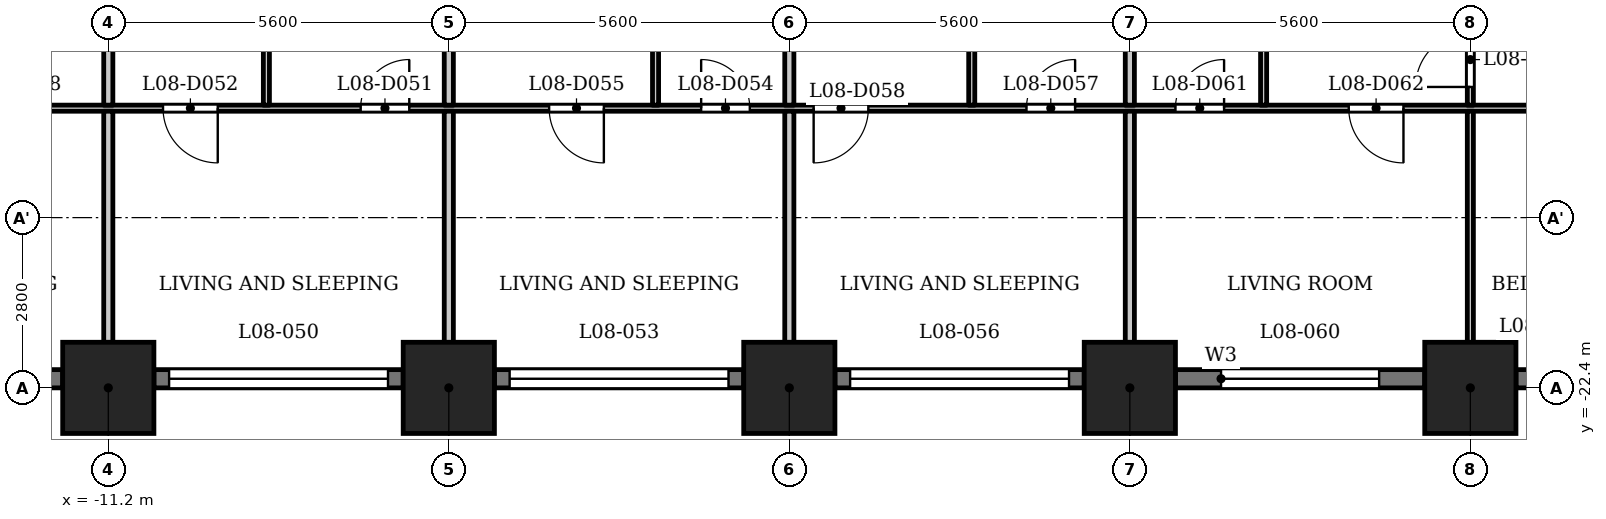
"""IFC4 building model, lengths in metres.
Left out: names, types, materials, properties, quantities, classifications, styles, units other than length and angle.
Written with IfcOpenShell. Run it as: python <this file> out.ifc"""

import sys

from ifc_helpers import new_model, si_unit, direction, frame, frame_2d, origin, origin_2d, place, context, subcontext, project, spatial, rectangle, extrude, element, fill, save


model = new_model("IFC4")
c1 = context("Model", 3, precision=1e-05, world=origin(), true_north=direction((0.0, 1.0)))
c2 = subcontext(c1, "Body", "Model", "MODEL_VIEW")
j1 = project(units=[si_unit("LENGTHUNIT", "METRE"), si_unit("PLANEANGLEUNIT", "RADIAN")], contexts=[c1])
p1 = place(None, origin())
s1 = spatial("IfcSite", under=j1, at=p1, CompositionType="ELEMENT")
p2 = place(p1, origin())
s2 = spatial("IfcBuilding", under=s1, at=p2, CompositionType="ELEMENT")
p3 = place(p2, frame((0.0, 0.0, 37.5)))
s3 = spatial("IfcBuildingStorey", under=s2, at=p3, CompositionType="ELEMENT", Elevation=37.5)
for number, where, z_axis, x_axis in (
    (1, (-11.2, -22.4, 0.0), (0.0, 0.0, 1.0), (1.0, 0.0, 0.0)),
    (2, (-5.6, -22.4, 0.0), (0.0, 0.0, 1.0), (1.0, 0.0, 0.0)),
    (3, (0.0, -22.4, 0.0), (0.0, 0.0, 1.0), (1.0, 0.0, 0.0)),
    (4, (5.6, -22.4, 0.0), (0.0, 0.0, 1.0), (1.0, 0.0, 0.0)),
    (5, (11.2, -22.4, 0.0), (0.0, 0.0, 1.0), (1.0, 0.0, 0.0)),
):
    element("IfcColumn", number, at=place(p3, frame(where, z_axis=z_axis, x_axis=x_axis)), inside=s3, PredefinedType="COLUMN", context=c2, shape_type="SweptSolid", body=[
        extrude(rectangle(XDim=1.5, YDim=1.5, at=origin_2d()), origin(), (0.0, 0.0, 1.0), 3.5),
    ])
p4 = place(p3, frame((-16.05, -22.25, 0.0), z_axis=(0.0, 0.0, 1.0), x_axis=(1.0, 0.0, 0.0)))
e6 = element("IfcWall", 6, at=p4, inside=s3, PredefinedType="SOLIDWALL", context=c2, shape_type="SweptSolid", body=[
    extrude(rectangle(XDim=4.1, YDim=0.3, at=frame_2d((2.05, 0.0))), origin(), (0.0, 0.0, 1.0), 2.35),
])
p5 = place(p4, frame((0.25, 0.0, 1.2)))
e7 = element("IfcOpeningElement", 7, at=p5, cuts=e6, PredefinedType="OPENING", context=c2, shape_type="SweptSolid", body=[
    extrude(rectangle(XDim=3.6, YDim=0.95, at=frame_2d((1.8, 0.475))), frame((0.0, 0.16, 0.0), z_axis=(0.0, -1.0, 0.0), x_axis=(1.0, 0.0, 0.0)), (0.0, 0.0, 1.0), 0.32),
])
p6 = place(p3, frame((-10.45, -22.25, 0.0), z_axis=(0.0, 0.0, 1.0), x_axis=(1.0, 0.0, 0.0)))
e8 = element("IfcWall", 8, at=p6, inside=s3, PredefinedType="SOLIDWALL", context=c2, shape_type="SweptSolid", body=[
    extrude(rectangle(XDim=4.1, YDim=0.3, at=frame_2d((2.05, 0.0))), origin(), (0.0, 0.0, 1.0), 2.35),
])
p7 = place(p6, frame((0.25, 0.0, 1.2)))
e9 = element("IfcOpeningElement", 9, at=p7, cuts=e8, PredefinedType="OPENING", context=c2, shape_type="SweptSolid", body=[
    extrude(rectangle(XDim=3.6, YDim=0.95, at=frame_2d((1.8, 0.475))), frame((0.0, 0.16, 0.0), z_axis=(0.0, -1.0, 0.0), x_axis=(1.0, 0.0, 0.0)), (0.0, 0.0, 1.0), 0.32),
])
p8 = place(p3, frame((-4.85, -22.25, 0.0), z_axis=(0.0, 0.0, 1.0), x_axis=(1.0, 0.0, 0.0)))
e10 = element("IfcWall", 10, at=p8, inside=s3, PredefinedType="SOLIDWALL", context=c2, shape_type="SweptSolid", body=[
    extrude(rectangle(XDim=4.1, YDim=0.3, at=frame_2d((2.05, 0.0))), origin(), (0.0, 0.0, 1.0), 2.35),
])
p9 = place(p8, frame((0.25, 0.0, 1.2)))
e11 = element("IfcOpeningElement", 11, at=p9, cuts=e10, PredefinedType="OPENING", context=c2, shape_type="SweptSolid", body=[
    extrude(rectangle(XDim=3.6, YDim=0.95, at=frame_2d((1.8, 0.475))), frame((0.0, 0.16, 0.0), z_axis=(0.0, -1.0, 0.0), x_axis=(1.0, 0.0, 0.0)), (0.0, 0.0, 1.0), 0.32),
])
p10 = place(p3, frame((0.75, -22.25, 0.0), z_axis=(0.0, 0.0, 1.0), x_axis=(1.0, 0.0, 0.0)))
e12 = element("IfcWall", 12, at=p10, inside=s3, PredefinedType="SOLIDWALL", context=c2, shape_type="SweptSolid", body=[
    extrude(rectangle(XDim=4.1, YDim=0.3, at=frame_2d((2.05, 0.0))), origin(), (0.0, 0.0, 1.0), 2.35),
])
p11 = place(p10, frame((0.25, 0.0, 1.2)))
e13 = element("IfcOpeningElement", 13, at=p11, cuts=e12, PredefinedType="OPENING", context=c2, shape_type="SweptSolid", body=[
    extrude(rectangle(XDim=3.6, YDim=0.95, at=frame_2d((1.8, 0.475))), frame((0.0, 0.16, 0.0), z_axis=(0.0, -1.0, 0.0), x_axis=(1.0, 0.0, 0.0)), (0.0, 0.0, 1.0), 0.32),
])
p12 = place(p3, frame((6.35, -22.25, 0.0), z_axis=(0.0, 0.0, 1.0), x_axis=(1.0, 0.0, 0.0)))
e14 = element("IfcWall", 14, at=p12, inside=s3, PredefinedType="SOLIDWALL", context=c2, shape_type="SweptSolid", body=[
    extrude(rectangle(XDim=4.1, YDim=0.3, at=frame_2d((2.05, 0.0))), origin(), (0.0, 0.0, 1.0), 2.35),
])
p13 = place(p12, frame((0.75, 0.0, 0.9)))
e15 = element("IfcOpeningElement", 15, at=p13, cuts=e14, PredefinedType="OPENING", context=c2, shape_type="SweptSolid", body=[
    extrude(rectangle(XDim=2.6, YDim=1.25, at=frame_2d((1.3, 0.625))), frame((0.0, 0.16, 0.0), z_axis=(0.0, -1.0, 0.0), x_axis=(1.0, 0.0, 0.0)), (0.0, 0.0, 1.0), 0.32),
])
p14 = place(p3, frame((11.95, -22.25, 0.0), z_axis=(0.0, 0.0, 1.0), x_axis=(1.0, 0.0, 0.0)))
e16 = element("IfcWall", 16, at=p14, inside=s3, PredefinedType="SOLIDWALL", context=c2, shape_type="SweptSolid", body=[
    extrude(rectangle(XDim=4.1, YDim=0.3, at=frame_2d((2.05, 0.0))), origin(), (0.0, 0.0, 1.0), 2.35),
])
p15 = place(p14, frame((0.387, 0.0, 0.6)))
e17 = element("IfcOpeningElement", 17, at=p15, cuts=e16, PredefinedType="OPENING", context=c2, shape_type="SweptSolid", body=[
    extrude(rectangle(XDim=1.2, YDim=1.55, at=frame_2d((0.6, 0.775))), frame((0.0, 0.16, 0.0), z_axis=(0.0, -1.0, 0.0), x_axis=(1.0, 0.0, 0.0)), (0.0, 0.0, 1.0), 0.32),
])
p16 = place(p14, frame((2.512, 0.0, 0.6)))
e18 = element("IfcOpeningElement", 18, at=p16, cuts=e16, PredefinedType="OPENING", context=c2, shape_type="SweptSolid", body=[
    extrude(rectangle(XDim=1.2, YDim=1.55, at=frame_2d((0.6, 0.775))), frame((0.0, 0.16, 0.0), z_axis=(0.0, -1.0, 0.0), x_axis=(1.0, 0.0, 0.0)), (0.0, 0.0, 1.0), 0.32),
])
p17 = place(p3, frame((-26.394, -17.8, 0.0), z_axis=(0.0, 0.0, 1.0), x_axis=(1.0, 0.0, 0.0)))
e19 = element("IfcWall", 19, at=p17, inside=s3, PredefinedType="PARTITIONING", context=c2, shape_type="SweptSolid", body=[
    extrude(rectangle(XDim=53.126, YDim=0.1, at=frame_2d((26.563, 0.0))), origin(), (0.0, 0.0, 1.0), 3.2),
])
p18 = place(p17, frame((0.794, 0.0, 0.0)))
e20 = element("IfcOpeningElement", 20, at=p18, cuts=e19, PredefinedType="OPENING", context=c2, shape_type="SweptSolid", body=[
    extrude(rectangle(XDim=0.8, YDim=2.1, at=frame_2d((0.4, 1.05))), frame((0.0, 0.06, 0.0), z_axis=(0.0, -1.0, 0.0), x_axis=(1.0, 0.0, 0.0)), (0.0, 0.0, 1.0), 0.12),
])
p19 = place(p17, frame((5.644, 0.0, 0.0)))
e21 = element("IfcOpeningElement", 21, at=p19, cuts=e19, PredefinedType="OPENING", context=c2, shape_type="SweptSolid", body=[
    extrude(rectangle(XDim=0.9, YDim=2.1, at=frame_2d((0.45, 1.05))), frame((0.0, 0.06, 0.0), z_axis=(0.0, -1.0, 0.0), x_axis=(1.0, 0.0, 0.0)), (0.0, 0.0, 1.0), 0.12),
])
p20 = place(p17, frame((13.244, 0.0, 0.0)))
e22 = element("IfcOpeningElement", 22, at=p20, cuts=e19, PredefinedType="OPENING", context=c2, shape_type="SweptSolid", body=[
    extrude(rectangle(XDim=0.8, YDim=2.1, at=frame_2d((0.4, 1.05))), frame((0.0, 0.06, 0.0), z_axis=(0.0, -1.0, 0.0), x_axis=(1.0, 0.0, 0.0)), (0.0, 0.0, 1.0), 0.12),
])
p21 = place(p17, frame((11.494, 0.0, 0.0)))
e23 = element("IfcOpeningElement", 23, at=p21, cuts=e19, PredefinedType="OPENING", context=c2, shape_type="SweptSolid", body=[
    extrude(rectangle(XDim=0.9, YDim=2.1, at=frame_2d((0.45, 1.05))), frame((0.0, 0.06, 0.0), z_axis=(0.0, -1.0, 0.0), x_axis=(1.0, 0.0, 0.0)), (0.0, 0.0, 1.0), 0.12),
])
p22 = place(p17, frame((19.344, 0.0, 0.0)))
e24 = element("IfcOpeningElement", 24, at=p22, cuts=e19, PredefinedType="OPENING", context=c2, shape_type="SweptSolid", body=[
    extrude(rectangle(XDim=0.8, YDim=2.1, at=frame_2d((0.4, 1.05))), frame((0.0, 0.06, 0.0), z_axis=(0.0, -1.0, 0.0), x_axis=(1.0, 0.0, 0.0)), (0.0, 0.0, 1.0), 0.12),
])
p23 = place(p17, frame((16.094, 0.0, 0.0)))
e25 = element("IfcOpeningElement", 25, at=p23, cuts=e19, PredefinedType="OPENING", context=c2, shape_type="SweptSolid", body=[
    extrude(rectangle(XDim=0.9, YDim=2.1, at=frame_2d((0.45, 1.05))), frame((0.0, 0.06, 0.0), z_axis=(0.0, -1.0, 0.0), x_axis=(1.0, 0.0, 0.0)), (0.0, 0.0, 1.0), 0.12),
])
p24 = place(p17, frame((24.944, 0.0, 0.0)))
e26 = element("IfcOpeningElement", 26, at=p24, cuts=e19, PredefinedType="OPENING", context=c2, shape_type="SweptSolid", body=[
    extrude(rectangle(XDim=0.8, YDim=2.1, at=frame_2d((0.4, 1.05))), frame((0.0, 0.06, 0.0), z_axis=(0.0, -1.0, 0.0), x_axis=(1.0, 0.0, 0.0)), (0.0, 0.0, 1.0), 0.12),
])
p25 = place(p17, frame((22.444, 0.0, 0.0)))
e27 = element("IfcOpeningElement", 27, at=p25, cuts=e19, PredefinedType="OPENING", context=c2, shape_type="SweptSolid", body=[
    extrude(rectangle(XDim=0.9, YDim=2.1, at=frame_2d((0.45, 1.05))), frame((0.0, 0.06, 0.0), z_axis=(0.0, -1.0, 0.0), x_axis=(1.0, 0.0, 0.0)), (0.0, 0.0, 1.0), 0.12),
])
p26 = place(p17, frame((30.294, 0.0, 0.0)))
e28 = element("IfcOpeningElement", 28, at=p26, cuts=e19, PredefinedType="OPENING", context=c2, shape_type="SweptSolid", body=[
    extrude(rectangle(XDim=0.8, YDim=2.1, at=frame_2d((0.4, 1.05))), frame((0.0, 0.06, 0.0), z_axis=(0.0, -1.0, 0.0), x_axis=(1.0, 0.0, 0.0)), (0.0, 0.0, 1.0), 0.12),
])
p27 = place(p17, frame((26.794, 0.0, 0.0)))
e29 = element("IfcOpeningElement", 29, at=p27, cuts=e19, PredefinedType="OPENING", context=c2, shape_type="SweptSolid", body=[
    extrude(rectangle(XDim=0.9, YDim=2.1, at=frame_2d((0.45, 1.05))), frame((0.0, 0.06, 0.0), z_axis=(0.0, -1.0, 0.0), x_axis=(1.0, 0.0, 0.0)), (0.0, 0.0, 1.0), 0.12),
])
p28 = place(p17, frame((32.744, 0.0, 0.0)))
e30 = element("IfcOpeningElement", 30, at=p28, cuts=e19, PredefinedType="OPENING", context=c2, shape_type="SweptSolid", body=[
    extrude(rectangle(XDim=0.8, YDim=2.1, at=frame_2d((0.4, 1.05))), frame((0.0, 0.06, 0.0), z_axis=(0.0, -1.0, 0.0), x_axis=(1.0, 0.0, 0.0)), (0.0, 0.0, 1.0), 0.12),
])
p29 = place(p17, frame((35.594, 0.0, 0.0)))
e31 = element("IfcOpeningElement", 31, at=p29, cuts=e19, PredefinedType="OPENING", context=c2, shape_type="SweptSolid", body=[
    extrude(rectangle(XDim=0.9, YDim=2.1, at=frame_2d((0.45, 1.05))), frame((0.0, 0.06, 0.0), z_axis=(0.0, -1.0, 0.0), x_axis=(1.0, 0.0, 0.0)), (0.0, 0.0, 1.0), 0.12),
])
p30 = place(p17, frame((39.244, 0.0, 0.0)))
e32 = element("IfcOpeningElement", 32, at=p30, cuts=e19, PredefinedType="OPENING", context=c2, shape_type="SweptSolid", body=[
    extrude(rectangle(XDim=0.9, YDim=2.1, at=frame_2d((0.45, 1.05))), frame((0.0, 0.06, 0.0), z_axis=(0.0, -1.0, 0.0), x_axis=(1.0, 0.0, 0.0)), (0.0, 0.0, 1.0), 0.12),
])
p31 = place(p17, frame((41.544, 0.0, 0.0)))
e33 = element("IfcOpeningElement", 33, at=p31, cuts=e19, PredefinedType="OPENING", context=c2, shape_type="SweptSolid", body=[
    extrude(rectangle(XDim=0.9, YDim=2.1, at=frame_2d((0.45, 1.05))), frame((0.0, 0.06, 0.0), z_axis=(0.0, -1.0, 0.0), x_axis=(1.0, 0.0, 0.0)), (0.0, 0.0, 1.0), 0.12),
])
p32 = place(p17, frame((49.362, 0.0, 0.0)))
e34 = element("IfcOpeningElement", 34, at=p32, cuts=e19, PredefinedType="OPENING", context=c2, shape_type="SweptSolid", body=[
    extrude(rectangle(XDim=0.8, YDim=2.1, at=frame_2d((0.4, 1.05))), frame((0.0, 0.06, 0.0), z_axis=(0.0, -1.0, 0.0), x_axis=(1.0, 0.0, 0.0)), (0.0, 0.0, 1.0), 0.12),
])
p33 = place(p17, frame((45.094, 0.0, 0.0)))
e35 = element("IfcOpeningElement", 35, at=p33, cuts=e19, PredefinedType="OPENING", context=c2, shape_type="SweptSolid", body=[
    extrude(rectangle(XDim=0.9, YDim=2.1, at=frame_2d((0.45, 1.05))), frame((0.0, 0.06, 0.0), z_axis=(0.0, -1.0, 0.0), x_axis=(1.0, 0.0, 0.0)), (0.0, 0.0, 1.0), 0.12),
])
p34 = place(p3, frame((-11.2, -23.13, 0.0), z_axis=(0.0, 0.0, 1.0), x_axis=(0.0, 1.0, 0.0)))
e36 = element("IfcWall", 36, at=p34, inside=s3, PredefinedType="PARTITIONING", context=c2, shape_type="SweptSolid", body=[
    extrude(rectangle(XDim=5.28, YDim=0.15, at=frame_2d((2.64, 0.0))), origin(), (0.0, 0.0, 1.0), 3.2),
])
p35 = place(p3, frame((-11.2, -17.75, 0.0), z_axis=(0.0, 0.0, 1.0), x_axis=(0.0, 1.0, 0.0)))
e37 = element("IfcWall", 37, at=p35, inside=s3, PredefinedType="PARTITIONING", context=c2, shape_type="SweptSolid", body=[
    extrude(rectangle(XDim=2.275, YDim=0.15, at=frame_2d((1.137, 0.0))), origin(), (0.0, 0.0, 1.0), 3.2),
])
p36 = place(p3, frame((-8.6, -17.75, 0.0), z_axis=(0.0, 0.0, 1.0), x_axis=(0.0, 1.0, 0.0)))
e38 = element("IfcWall", 38, at=p36, inside=s3, PredefinedType="PARTITIONING", context=c2, shape_type="SweptSolid", body=[
    extrude(rectangle(XDim=2.275, YDim=0.1, at=frame_2d((1.137, 0.0))), origin(), (0.0, 0.0, 1.0), 3.2),
])
p37 = place(p3, frame((-5.6, -23.13, 0.0), z_axis=(0.0, 0.0, 1.0), x_axis=(0.0, 1.0, 0.0)))
e39 = element("IfcWall", 39, at=p37, inside=s3, PredefinedType="PARTITIONING", context=c2, shape_type="SweptSolid", body=[
    extrude(rectangle(XDim=5.28, YDim=0.15, at=frame_2d((2.64, 0.0))), origin(), (0.0, 0.0, 1.0), 3.2),
])
p38 = place(p3, frame((-5.6, -17.75, 0.0), z_axis=(0.0, 0.0, 1.0), x_axis=(0.0, 1.0, 0.0)))
e40 = element("IfcWall", 40, at=p38, inside=s3, PredefinedType="PARTITIONING", context=c2, shape_type="SweptSolid", body=[
    extrude(rectangle(XDim=2.275, YDim=0.15, at=frame_2d((1.137, 0.0))), origin(), (0.0, 0.0, 1.0), 3.2),
])
p39 = place(p3, frame((-2.2, -17.75, 0.0), z_axis=(0.0, 0.0, 1.0), x_axis=(0.0, 1.0, 0.0)))
e41 = element("IfcWall", 41, at=p39, inside=s3, PredefinedType="PARTITIONING", context=c2, shape_type="SweptSolid", body=[
    extrude(rectangle(XDim=2.275, YDim=0.1, at=frame_2d((1.137, 0.0))), origin(), (0.0, 0.0, 1.0), 3.2),
])
p40 = place(p3, frame((0.0, -23.13, 0.0), z_axis=(0.0, 0.0, 1.0), x_axis=(0.0, 1.0, 0.0)))
e42 = element("IfcWall", 42, at=p40, inside=s3, PredefinedType="PARTITIONING", context=c2, shape_type="SweptSolid", body=[
    extrude(rectangle(XDim=5.28, YDim=0.15, at=frame_2d((2.64, 0.0))), origin(), (0.0, 0.0, 1.0), 3.2),
])
p41 = place(p3, frame((0.0, -17.75, 0.0), z_axis=(0.0, 0.0, 1.0), x_axis=(0.0, 1.0, 0.0)))
e43 = element("IfcWall", 43, at=p41, inside=s3, PredefinedType="PARTITIONING", context=c2, shape_type="SweptSolid", body=[
    extrude(rectangle(XDim=2.275, YDim=0.15, at=frame_2d((1.137, 0.0))), origin(), (0.0, 0.0, 1.0), 3.2),
])
p42 = place(p3, frame((3.0, -17.75, 0.0), z_axis=(0.0, 0.0, 1.0), x_axis=(0.0, 1.0, 0.0)))
e44 = element("IfcWall", 44, at=p42, inside=s3, PredefinedType="PARTITIONING", context=c2, shape_type="SweptSolid", body=[
    extrude(rectangle(XDim=2.275, YDim=0.1, at=frame_2d((1.137, 0.0))), origin(), (0.0, 0.0, 1.0), 3.2),
])
p43 = place(p3, frame((5.6, -23.13, 0.0), z_axis=(0.0, 0.0, 1.0), x_axis=(0.0, 1.0, 0.0)))
e45 = element("IfcWall", 45, at=p43, inside=s3, PredefinedType="PARTITIONING", context=c2, shape_type="SweptSolid", body=[
    extrude(rectangle(XDim=5.28, YDim=0.15, at=frame_2d((2.64, 0.0))), origin(), (0.0, 0.0, 1.0), 3.2),
])
p44 = place(p3, frame((5.6, -17.75, 0.0), z_axis=(0.0, 0.0, 1.0), x_axis=(0.0, 1.0, 0.0)))
e46 = element("IfcWall", 46, at=p44, inside=s3, PredefinedType="PARTITIONING", context=c2, shape_type="SweptSolid", body=[
    extrude(rectangle(XDim=2.275, YDim=0.15, at=frame_2d((1.137, 0.0))), origin(), (0.0, 0.0, 1.0), 3.2),
])
p45 = place(p3, frame((7.8, -17.75, 0.0), z_axis=(0.0, 0.0, 1.0), x_axis=(0.0, 1.0, 0.0)))
e47 = element("IfcWall", 47, at=p45, inside=s3, PredefinedType="PARTITIONING", context=c2, shape_type="SweptSolid", body=[
    extrude(rectangle(XDim=2.275, YDim=0.1, at=frame_2d((1.137, 0.0))), origin(), (0.0, 0.0, 1.0), 3.2),
])
p46 = place(p3, frame((11.2, -23.13, 0.0), z_axis=(0.0, 0.0, 1.0), x_axis=(0.0, 1.0, 0.0)))
e48 = element("IfcWall", 48, at=p46, inside=s3, PredefinedType="PARTITIONING", context=c2, shape_type="SweptSolid", body=[
    extrude(rectangle(XDim=5.28, YDim=0.1, at=frame_2d((2.64, 0.0))), origin(), (0.0, 0.0, 1.0), 3.2),
])
p47 = place(p3, frame((11.2, -17.75, 0.0), z_axis=(0.0, 0.0, 1.0), x_axis=(0.0, 1.0, 0.0)))
e49 = element("IfcWall", 49, at=p47, inside=s3, PredefinedType="PARTITIONING", context=c2, shape_type="SweptSolid", body=[
    extrude(rectangle(XDim=2.275, YDim=0.1, at=frame_2d((1.137, 0.0))), origin(), (0.0, 0.0, 1.0), 3.2),
])
p48 = place(p47, frame((0.299, 0.0, 0.0)))
e50 = element("IfcOpeningElement", 50, at=p48, cuts=e49, PredefinedType="OPENING", context=c2, shape_type="SweptSolid", body=[
    extrude(rectangle(XDim=0.9, YDim=2.1, at=frame_2d((0.45, 1.05))), frame((0.0, 0.06, 0.0), z_axis=(0.0, -1.0, 0.0), x_axis=(1.0, 0.0, 0.0)), (0.0, 0.0, 1.0), 0.12),
])
p49 = place(p22, origin())
e51 = element("IfcDoor", 51, at=p49, inside=s3, OperationType="SINGLE_SWING_LEFT", PredefinedType="DOOR", context=c2, shape_type="SweptSolid", body=[
    extrude(rectangle(XDim=0.8, YDim=2.1, at=frame_2d((0.4, 1.05))), frame((0.0, 0.025, 0.0), z_axis=(0.0, -1.0, 0.0), x_axis=(1.0, 0.0, 0.0)), (0.0, 0.0, 1.0), 0.05),
])
fill(e24, e51)
p50 = place(p23, origin())
e52 = element("IfcDoor", 52, at=p50, inside=s3, OperationType="SINGLE_SWING_RIGHT", PredefinedType="DOOR", context=c2, shape_type="SweptSolid", body=[
    extrude(rectangle(XDim=0.9, YDim=2.1, at=frame_2d((0.45, 1.05))), frame((0.0, 0.025, 0.0), z_axis=(0.0, -1.0, 0.0), x_axis=(1.0, 0.0, 0.0)), (0.0, 0.0, 1.0), 0.05),
])
fill(e25, e52)
p51 = place(p24, origin())
e53 = element("IfcDoor", 53, at=p51, inside=s3, OperationType="SINGLE_SWING_RIGHT", PredefinedType="DOOR", context=c2, shape_type="SweptSolid", body=[
    extrude(rectangle(XDim=0.8, YDim=2.1, at=frame_2d((0.4, 1.05))), frame((0.0, 0.025, 0.0), z_axis=(0.0, -1.0, 0.0), x_axis=(1.0, 0.0, 0.0)), (0.0, 0.0, 1.0), 0.05),
])
fill(e26, e53)
p52 = place(p25, origin())
e54 = element("IfcDoor", 54, at=p52, inside=s3, OperationType="SINGLE_SWING_RIGHT", PredefinedType="DOOR", context=c2, shape_type="SweptSolid", body=[
    extrude(rectangle(XDim=0.9, YDim=2.1, at=frame_2d((0.45, 1.05))), frame((0.0, 0.025, 0.0), z_axis=(0.0, -1.0, 0.0), x_axis=(1.0, 0.0, 0.0)), (0.0, 0.0, 1.0), 0.05),
])
fill(e27, e54)
p53 = place(p26, origin())
e55 = element("IfcDoor", 55, at=p53, inside=s3, OperationType="SINGLE_SWING_LEFT", PredefinedType="DOOR", context=c2, shape_type="SweptSolid", body=[
    extrude(rectangle(XDim=0.8, YDim=2.1, at=frame_2d((0.4, 1.05))), frame((0.0, 0.025, 0.0), z_axis=(0.0, -1.0, 0.0), x_axis=(1.0, 0.0, 0.0)), (0.0, 0.0, 1.0), 0.05),
])
fill(e28, e55)
p54 = place(p27, origin())
e56 = element("IfcDoor", 56, at=p54, inside=s3, OperationType="SINGLE_SWING_LEFT", PredefinedType="DOOR", context=c2, shape_type="SweptSolid", body=[
    extrude(rectangle(XDim=0.9, YDim=2.1, at=frame_2d((0.45, 1.05))), frame((0.0, 0.025, 0.0), z_axis=(0.0, -1.0, 0.0), x_axis=(1.0, 0.0, 0.0)), (0.0, 0.0, 1.0), 0.05),
])
fill(e29, e56)
p55 = place(p48, origin())
e57 = element("IfcDoor", 57, at=p55, inside=s3, OperationType="SINGLE_SWING_RIGHT", PredefinedType="DOOR", context=c2, shape_type="SweptSolid", body=[
    extrude(rectangle(XDim=0.9, YDim=2.1, at=frame_2d((0.45, 1.05))), frame((0.0, 0.025, 0.0), z_axis=(0.0, -1.0, 0.0), x_axis=(1.0, 0.0, 0.0)), (0.0, 0.0, 1.0), 0.05),
])
fill(e50, e57)
p56 = place(p28, origin())
e58 = element("IfcDoor", 58, at=p56, inside=s3, OperationType="SINGLE_SWING_LEFT", PredefinedType="DOOR", context=c2, shape_type="SweptSolid", body=[
    extrude(rectangle(XDim=0.8, YDim=2.1, at=frame_2d((0.4, 1.05))), frame((0.0, 0.025, 0.0), z_axis=(0.0, -1.0, 0.0), x_axis=(1.0, 0.0, 0.0)), (0.0, 0.0, 1.0), 0.05),
])
fill(e30, e58)
p57 = place(p29, origin())
e59 = element("IfcDoor", 59, at=p57, inside=s3, OperationType="SINGLE_SWING_RIGHT", PredefinedType="DOOR", context=c2, shape_type="SweptSolid", body=[
    extrude(rectangle(XDim=0.9, YDim=2.1, at=frame_2d((0.45, 1.05))), frame((0.0, 0.025, 0.0), z_axis=(0.0, -1.0, 0.0), x_axis=(1.0, 0.0, 0.0)), (0.0, 0.0, 1.0), 0.05),
])
fill(e31, e59)
p58 = place(p7, origin())
e60 = element("IfcWindow", 60, at=p58, inside=s3, PartitioningType="SINGLE_PANEL", PredefinedType="WINDOW", context=c2, shape_type="SweptSolid", body=[
    extrude(rectangle(XDim=3.6, YDim=0.95, at=frame_2d((1.8, 0.475))), frame((0.0, 0.03, 0.0), z_axis=(0.0, -1.0, 0.0), x_axis=(1.0, 0.0, 0.0)), (0.0, 0.0, 1.0), 0.06),
])
fill(e9, e60)
p59 = place(p9, origin())
e61 = element("IfcWindow", 61, at=p59, inside=s3, PartitioningType="SINGLE_PANEL", PredefinedType="WINDOW", context=c2, shape_type="SweptSolid", body=[
    extrude(rectangle(XDim=3.6, YDim=0.95, at=frame_2d((1.8, 0.475))), frame((0.0, 0.03, 0.0), z_axis=(0.0, -1.0, 0.0), x_axis=(1.0, 0.0, 0.0)), (0.0, 0.0, 1.0), 0.06),
])
fill(e11, e61)
p60 = place(p11, origin())
e62 = element("IfcWindow", 62, at=p60, inside=s3, PartitioningType="SINGLE_PANEL", PredefinedType="WINDOW", context=c2, shape_type="SweptSolid", body=[
    extrude(rectangle(XDim=3.6, YDim=0.95, at=frame_2d((1.8, 0.475))), frame((0.0, 0.03, 0.0), z_axis=(0.0, -1.0, 0.0), x_axis=(1.0, 0.0, 0.0)), (0.0, 0.0, 1.0), 0.06),
])
fill(e13, e62)
p61 = place(p13, origin())
e63 = element("IfcWindow", 63, at=p61, inside=s3, PartitioningType="SINGLE_PANEL", PredefinedType="WINDOW", context=c2, shape_type="SweptSolid", body=[
    extrude(rectangle(XDim=2.6, YDim=1.25, at=frame_2d((1.3, 0.625))), frame((0.0, 0.03, 0.0), z_axis=(0.0, -1.0, 0.0), x_axis=(1.0, 0.0, 0.0)), (0.0, 0.0, 1.0), 0.06),
])
fill(e15, e63)
save(model, sys.argv[1])
